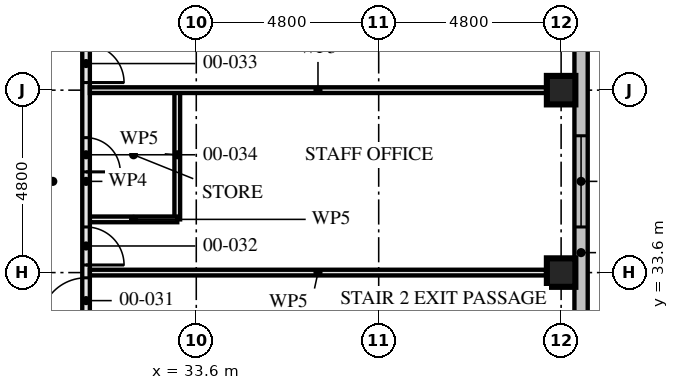
"""IFC4 building model, lengths in metres.
Left out: names, types, materials, properties, quantities, classifications, styles, units other than length and angle.
Written with IfcOpenShell. Run it as: python <this file> out.ifc"""

import sys

from ifc_helpers import new_model, si_unit, direction, frame, frame_2d, origin, origin_2d, place, context, subcontext, project, spatial, rectangle, hollow_rectangle, extrude, element, fill, save


model = new_model("IFC4")
c1 = context("Model", 3, precision=1e-05, world=origin(), true_north=direction((0.0, 1.0)))
c2 = subcontext(c1, "Body", "Model", "MODEL_VIEW")
j1 = project(units=[si_unit("LENGTHUNIT", "METRE"), si_unit("PLANEANGLEUNIT", "RADIAN")], contexts=[c1])
p1 = place(None, origin())
s1 = spatial("IfcSite", under=j1, at=p1, CompositionType="ELEMENT")
p2 = place(p1, origin())
s2 = spatial("IfcBuilding", under=s1, at=p2, CompositionType="ELEMENT")
p3 = place(p2, origin())
s3 = spatial("IfcBuildingStorey", under=s2, at=p3, CompositionType="ELEMENT", Elevation=0.0)
for number, where, z_axis, x_axis in (
    (1, (43.2, 33.6, 0.0), (0.0, 0.0, 1.0), (1.0, 0.0, 0.0)),
    (2, (43.2, 38.4, 0.0), (0.0, 0.0, 1.0), (1.0, 0.0, 0.0)),
):
    element("IfcColumn", number, at=place(p3, frame(where, z_axis=z_axis, x_axis=x_axis)), inside=s3, PredefinedType="COLUMN", context=c2, shape_type="SweptSolid", body=[
        extrude(hollow_rectangle(XDim=0.75, YDim=0.75, WallThickness=0.08, at=origin_2d()), origin(), (0.0, 0.0, 1.0), 4.5),
    ])
p4 = place(p3, frame((43.725, 14.925, 0.0), z_axis=(0.0, 0.0, 1.0), x_axis=(0.0, 1.0, 0.0)))
e3 = element("IfcWall", 3, at=p4, inside=s3, PredefinedType="SOLIDWALL", context=c2, shape_type="SweptSolid", body=[
    extrude(rectangle(XDim=38.4, YDim=0.35, at=frame_2d((19.2, 0.0))), origin(), (0.0, 0.0, 1.0), 4.5),
])
p5 = place(p4, frame((15.675, 0.0, 0.0)))
e4 = element("IfcOpeningElement", 4, at=p5, cuts=e3, PredefinedType="OPENING", context=c2, shape_type="SweptSolid", body=[
    extrude(rectangle(XDim=1.2, YDim=2.4, at=frame_2d((0.6, 1.2))), frame((0.0, 0.186, 0.0), z_axis=(0.0, -1.0, 0.0), x_axis=(1.0, 0.0, 0.0)), (0.0, 0.0, 1.0), 0.371),
])
p6 = place(p4, frame((0.675, 0.0, 0.9)))
e5 = element("IfcOpeningElement", 5, at=p6, cuts=e3, PredefinedType="OPENING", context=c2, shape_type="SweptSolid", body=[
    extrude(rectangle(XDim=2.4, YDim=2.4, at=frame_2d((1.2, 1.2))), frame((0.0, 0.186, 0.0), z_axis=(0.0, -1.0, 0.0), x_axis=(1.0, 0.0, 0.0)), (0.0, 0.0, 1.0), 0.371),
])
p7 = place(p4, frame((5.475, 0.0, 0.9)))
e6 = element("IfcOpeningElement", 6, at=p7, cuts=e3, PredefinedType="OPENING", context=c2, shape_type="SweptSolid", body=[
    extrude(rectangle(XDim=2.4, YDim=2.4, at=frame_2d((1.2, 1.2))), frame((0.0, 0.186, 0.0), z_axis=(0.0, -1.0, 0.0), x_axis=(1.0, 0.0, 0.0)), (0.0, 0.0, 1.0), 0.371),
])
p8 = place(p4, frame((10.275, 0.0, 0.9)))
e7 = element("IfcOpeningElement", 7, at=p8, cuts=e3, PredefinedType="OPENING", context=c2, shape_type="SweptSolid", body=[
    extrude(rectangle(XDim=2.4, YDim=2.4, at=frame_2d((1.2, 1.2))), frame((0.0, 0.186, 0.0), z_axis=(0.0, -1.0, 0.0), x_axis=(1.0, 0.0, 0.0)), (0.0, 0.0, 1.0), 0.371),
])
p9 = place(p4, frame((19.875, 0.0, 0.9)))
e8 = element("IfcOpeningElement", 8, at=p9, cuts=e3, PredefinedType="OPENING", context=c2, shape_type="SweptSolid", body=[
    extrude(rectangle(XDim=2.4, YDim=2.4, at=frame_2d((1.2, 1.2))), frame((0.0, 0.186, 0.0), z_axis=(0.0, -1.0, 0.0), x_axis=(1.0, 0.0, 0.0)), (0.0, 0.0, 1.0), 0.371),
])
p10 = place(p4, frame((24.675, 0.0, 0.9)))
e9 = element("IfcOpeningElement", 9, at=p10, cuts=e3, PredefinedType="OPENING", context=c2, shape_type="SweptSolid", body=[
    extrude(rectangle(XDim=2.4, YDim=2.4, at=frame_2d((1.2, 1.2))), frame((0.0, 0.186, 0.0), z_axis=(0.0, -1.0, 0.0), x_axis=(1.0, 0.0, 0.0)), (0.0, 0.0, 1.0), 0.371),
])
p11 = place(p4, frame((29.475, 0.0, 0.9)))
e10 = element("IfcOpeningElement", 10, at=p11, cuts=e3, PredefinedType="OPENING", context=c2, shape_type="SweptSolid", body=[
    extrude(rectangle(XDim=2.4, YDim=2.4, at=frame_2d((1.2, 1.2))), frame((0.0, 0.186, 0.0), z_axis=(0.0, -1.0, 0.0), x_axis=(1.0, 0.0, 0.0)), (0.0, 0.0, 1.0), 0.371),
])
p12 = place(p4, frame((34.275, 0.0, 0.9)))
e11 = element("IfcOpeningElement", 11, at=p12, cuts=e3, PredefinedType="OPENING", context=c2, shape_type="SweptSolid", body=[
    extrude(rectangle(XDim=2.4, YDim=2.4, at=frame_2d((1.2, 1.2))), frame((0.0, 0.186, 0.0), z_axis=(0.0, -1.0, 0.0), x_axis=(1.0, 0.0, 0.0)), (0.0, 0.0, 1.0), 0.371),
])
p13 = place(p3, frame((33.1, 35.0, 0.0), z_axis=(0.0, 0.0, 1.0), x_axis=(-1.0, 0.0, 0.0)))
e12 = element("IfcWall", 12, at=p13, inside=s3, PredefinedType="PARTITIONING", context=c2, shape_type="SweptSolid", body=[
    extrude(rectangle(XDim=2.3, YDim=0.15, at=frame_2d((1.15, 0.0))), origin(), (0.0, 0.0, 1.0), 4.33),
])
p14 = place(p3, frame((33.1, 35.0, 0.0), z_axis=(0.0, 0.0, 1.0), x_axis=(0.0, 1.0, 0.0)))
e13 = element("IfcWall", 13, at=p14, inside=s3, PredefinedType="PARTITIONING", context=c2, shape_type="SweptSolid", body=[
    extrude(rectangle(XDim=3.4, YDim=0.15, at=frame_2d((1.7, 0.0))), origin(), (0.0, 0.0, 1.0), 4.33),
])
for number, where, z_axis, x_axis in (
    (14, (42.805, 33.6, 0.0), (0.0, 0.0, 1.0), (-1.0, 0.0, 0.0)),
    (15, (42.805, 38.4, 0.0), (0.0, 0.0, 1.0), (-1.0, 0.0, 0.0)),
):
    element("IfcWall", number, at=place(p3, frame(where, z_axis=z_axis, x_axis=x_axis)), inside=s3, PredefinedType="PARTITIONING", context=c2, shape_type="SweptSolid", body=[
        extrude(rectangle(XDim=12.005, YDim=0.15, at=frame_2d((6.002, 0.0))), origin(), (0.0, 0.0, 1.0), 3.55),
    ])
p15 = place(p3, frame((30.7, 28.8, 0.0), z_axis=(0.0, 0.0, 1.0), x_axis=(0.0, 1.0, 0.0)))
e16 = element("IfcWall", 16, at=p15, inside=s3, PredefinedType="PARTITIONING", context=c2, shape_type="SweptSolid", body=[
    extrude(rectangle(XDim=14.4, YDim=0.2, at=frame_2d((7.2, 0.0))), origin(), (0.0, 0.0, 1.0), 3.55),
])
p16 = place(p15, frame((3.462, 0.0, 0.0)))
e17 = element("IfcOpeningElement", 17, at=p16, cuts=e16, PredefinedType="OPENING", context=c2, shape_type="SweptSolid", body=[
    extrude(rectangle(XDim=1.2, YDim=2.4, at=frame_2d((0.6, 1.2))), frame((0.0, 0.111, 0.0), z_axis=(0.0, -1.0, 0.0), x_axis=(1.0, 0.0, 0.0)), (0.0, 0.0, 1.0), 0.221),
])
p17 = place(p15, frame((5.0, 0.0, 0.0)))
e18 = element("IfcOpeningElement", 18, at=p17, cuts=e16, PredefinedType="OPENING", context=c2, shape_type="SweptSolid", body=[
    extrude(rectangle(XDim=1.0, YDim=2.4, at=frame_2d((0.5, 1.2))), frame((0.0, 0.111, 0.0), z_axis=(0.0, -1.0, 0.0), x_axis=(1.0, 0.0, 0.0)), (0.0, 0.0, 1.0), 0.221),
])
p18 = place(p15, frame((9.8, 0.0, 0.0)))
e19 = element("IfcOpeningElement", 19, at=p18, cuts=e16, PredefinedType="OPENING", context=c2, shape_type="SweptSolid", body=[
    extrude(rectangle(XDim=1.0, YDim=2.4, at=frame_2d((0.5, 1.2))), frame((0.0, 0.111, 0.0), z_axis=(0.0, -1.0, 0.0), x_axis=(1.0, 0.0, 0.0)), (0.0, 0.0, 1.0), 0.221),
])
p19 = place(p15, frame((7.45, 0.0, 0.0)))
e20 = element("IfcOpeningElement", 20, at=p19, cuts=e16, PredefinedType="OPENING", context=c2, shape_type="SweptSolid", body=[
    extrude(rectangle(XDim=0.9, YDim=2.1, at=frame_2d((0.45, 1.05))), frame((0.0, 0.111, 0.0), z_axis=(0.0, -1.0, 0.0), x_axis=(1.0, 0.0, 0.0)), (0.0, 0.0, 1.0), 0.221),
])
p20 = place(p15, frame((12.2, 0.0, 0.0)))
e21 = element("IfcOpeningElement", 21, at=p20, cuts=e16, PredefinedType="OPENING", context=c2, shape_type="SweptSolid", body=[
    extrude(rectangle(XDim=1.0, YDim=2.1, at=frame_2d((0.5, 1.05))), frame((0.0, 0.111, 0.0), z_axis=(0.0, -1.0, 0.0), x_axis=(1.0, 0.0, 0.0)), (0.0, 0.0, 1.0), 0.221),
])
p21 = place(p9, origin())
e22 = element("IfcWindow", 22, at=p21, inside=s3, PartitioningType="SINGLE_PANEL", PredefinedType="WINDOW", context=c2, shape_type="SweptSolid", body=[
    extrude(rectangle(XDim=2.4, YDim=2.4, at=frame_2d((1.2, 1.2))), frame((0.0, 0.03, 0.0), z_axis=(0.0, -1.0, 0.0), x_axis=(1.0, 0.0, 0.0)), (0.0, 0.0, 1.0), 0.06),
])
fill(e8, e22)
p22 = place(p16, origin())
e23 = element("IfcDoor", 23, at=p22, inside=s3, OperationType="SINGLE_SWING_RIGHT", PredefinedType="DOOR", context=c2, shape_type="SweptSolid", body=[
    extrude(rectangle(XDim=1.2, YDim=2.4, at=frame_2d((0.6, 1.2))), frame((0.0, 0.027, 0.0), z_axis=(0.0, -1.0, 0.0), x_axis=(1.0, 0.0, 0.0)), (0.0, 0.0, 1.0), 0.054),
])
fill(e17, e23)
p23 = place(p17, frame((1.0, 0.0, 0.0), z_axis=(0.0, 0.0, 1.0), x_axis=(-1.0, 0.0, 0.0)))
e24 = element("IfcDoor", 24, at=p23, inside=s3, OperationType="SINGLE_SWING_LEFT", PredefinedType="DOOR", context=c2, shape_type="SweptSolid", body=[
    extrude(rectangle(XDim=1.0, YDim=2.4, at=frame_2d((0.5, 1.2))), frame((0.0, 0.027, 0.0), z_axis=(0.0, -1.0, 0.0), x_axis=(1.0, 0.0, 0.0)), (0.0, 0.0, 1.0), 0.054),
])
fill(e18, e24)
p24 = place(p18, frame((1.0, 0.0, 0.0), z_axis=(0.0, 0.0, 1.0), x_axis=(-1.0, 0.0, 0.0)))
e25 = element("IfcDoor", 25, at=p24, inside=s3, OperationType="SINGLE_SWING_LEFT", PredefinedType="DOOR", context=c2, shape_type="SweptSolid", body=[
    extrude(rectangle(XDim=1.0, YDim=2.4, at=frame_2d((0.5, 1.2))), frame((0.0, 0.027, 0.0), z_axis=(0.0, -1.0, 0.0), x_axis=(1.0, 0.0, 0.0)), (0.0, 0.0, 1.0), 0.054),
])
fill(e19, e25)
p25 = place(p19, frame((0.9, 0.0, 0.0), z_axis=(0.0, 0.0, 1.0), x_axis=(-1.0, 0.0, 0.0)))
e26 = element("IfcDoor", 26, at=p25, inside=s3, OperationType="SINGLE_SWING_LEFT", PredefinedType="DOOR", context=c2, shape_type="SweptSolid", body=[
    extrude(rectangle(XDim=0.9, YDim=2.1, at=frame_2d((0.45, 1.05))), frame((0.0, 0.027, 0.0), z_axis=(0.0, -1.0, 0.0), x_axis=(1.0, 0.0, 0.0)), (0.0, 0.0, 1.0), 0.054),
])
fill(e20, e26)
save(model, sys.argv[1])
